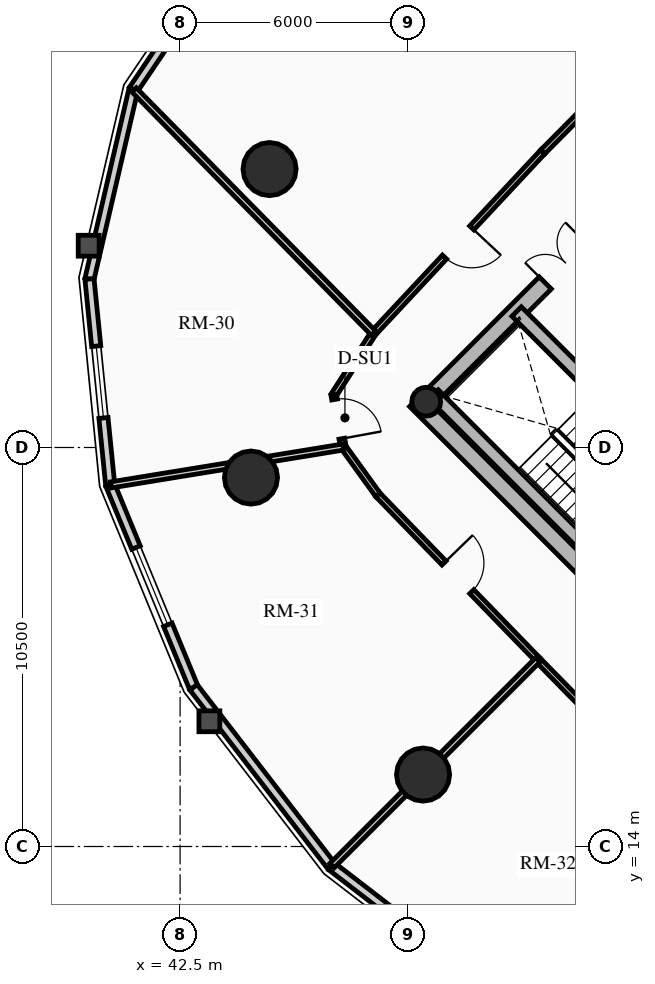
"""IFC4 building model, lengths in metres.
Left out: names, types, materials, properties, quantities, classifications, styles, units other than length and angle.
Written with IfcOpenShell. Run it as: python <this file> out.ifc"""

import sys

from ifc_helpers import new_model, si_unit, direction, frame, frame_2d, origin, origin_2d, place, context, subcontext, project, spatial, rectangle, circle, hollow_circle, extrude, source, transform, mapped, element, fill, save


model = new_model("IFC4")
c1 = context("Model", 3, precision=1e-05, world=origin(), true_north=direction((0.0, 1.0)))
c2 = subcontext(c1, "Body", "Model", "MODEL_VIEW")
j1 = project(units=[si_unit("LENGTHUNIT", "METRE"), si_unit("PLANEANGLEUNIT", "RADIAN")], contexts=[c1])
p1 = place(None, origin())
s1 = spatial("IfcSite", under=j1, at=p1, CompositionType="ELEMENT")
p2 = place(p1, origin())
s2 = spatial("IfcBuilding", under=s1, at=p2, CompositionType="ELEMENT")
p3 = place(p2, frame((0.0, 0.0, 81.79)))
s3 = spatial("IfcBuildingStorey", under=s2, at=p3, CompositionType="ELEMENT", Elevation=81.79)
p4 = place(p3, frame((58.737, 15.697, 0.0), z_axis=(0.0, 0.0, 1.0), x_axis=(-0.707106781187, 0.707106781187, 0.0)))
e1 = element("IfcWall", 1, at=p4, inside=s3, PredefinedType="SHEAR", context=c2, shape_type="SweptSolid", body=[
    extrude(rectangle(XDim=14.2, YDim=0.45, at=frame_2d((7.1, 0.0))), origin(), (0.0, 0.0, 1.0), 2.91),
])
p5 = place(p3, frame((48.856, 25.578, 0.0), z_axis=(0.0, 0.0, 1.0), x_axis=(0.707106781187, 0.707106781187, 0.0)))
e2 = element("IfcWall", 2, at=p5, inside=s3, PredefinedType="SHEAR", context=c2, shape_type="SweptSolid", body=[
    extrude(rectangle(XDim=10.7, YDim=0.45, at=frame_2d((5.35, 0.0))), origin(), (0.0, 0.0, 1.0), 2.91),
])
m1 = source(origin(), c2, "Body", "SweptSolid", [
    extrude(rectangle(XDim=1.5, YDim=2.02, at=frame_2d((0.75, 1.01))), frame((0.0, 0.235, 0.0), z_axis=(0.0, -1.0, 0.0), x_axis=(1.0, 0.0, 0.0)), (0.0, 0.0, 1.0), 0.47),
])
p6 = place(p5, frame((4.6, 0.0, 0.0)))
e3 = element("IfcOpeningElement", 3, at=p6, cuts=e2, PredefinedType="OPENING", context=c2, shape_type="MappedRepresentation", body=[
    mapped(m1, transform((0.0, 0.0, 0.0), x_axis=(1.0, 0.0, 0.0), y_axis=(0.0, 1.0, 0.0), z_axis=(0.0, 0.0, 1.0), scale=1.0)),
])
p7 = place(p3, frame((61.078, 18.355, 0.0), z_axis=(0.0, 0.0, 1.0), x_axis=(-0.707106781187, 0.707106781187, 0.0)))
e4 = element("IfcWall", 4, at=p7, inside=s3, PredefinedType="SHEAR", context=c2, shape_type="SweptSolid", body=[
    extrude(rectangle(XDim=13.75, YDim=0.35, at=frame_2d((6.875, 0.0))), origin(), (0.0, 0.0, 1.0), 2.91),
])
m2 = source(origin(), c2, "Body", "SweptSolid", [
    extrude(rectangle(XDim=1.1, YDim=2.015, at=frame_2d((0.55, 1.007))), frame((0.0, 0.185, 0.0), z_axis=(0.0, -1.0, 0.0), x_axis=(1.0, 0.0, 0.0)), (0.0, 0.0, 1.0), 0.37),
])
p8 = place(p7, frame((4.875, 0.0, 0.0)))
e5 = element("IfcOpeningElement", 5, at=p8, cuts=e4, PredefinedType="OPENING", context=c2, shape_type="MappedRepresentation", body=[
    mapped(m2, transform((0.0, 0.0, 0.0), x_axis=(1.0, 0.0, 0.0), y_axis=(0.0, 1.0, 0.0), z_axis=(0.0, 0.0, 1.0), scale=1.0)),
])
m3 = source(origin(), c2, "Body", "SweptSolid", [
    extrude(rectangle(XDim=1.15, YDim=2.02, at=frame_2d((0.575, 1.01))), frame((0.0, 0.185, 0.0), z_axis=(0.0, -1.0, 0.0), x_axis=(1.0, 0.0, 0.0)), (0.0, 0.0, 1.0), 0.37),
])
p9 = place(p7, frame((7.295, 0.0, 0.0)))
e6 = element("IfcOpeningElement", 6, at=p9, cuts=e4, PredefinedType="OPENING", context=c2, shape_type="MappedRepresentation", body=[
    mapped(m3, transform((0.0, 0.0, 0.0), x_axis=(1.0, 0.0, 0.0), y_axis=(0.0, 1.0, 0.0), z_axis=(0.0, 0.0, 1.0), scale=1.0)),
])
p10 = place(p3, frame((53.922, 21.141, 0.0), z_axis=(0.0, 0.0, 1.0), x_axis=(-0.707088616009, 0.707124945897, 0.0)))
e7 = element("IfcWall", 7, at=p10, inside=s3, PredefinedType="SHEAR", context=c2, shape_type="SweptSolid", body=[
    extrude(rectangle(XDim=6.72, YDim=0.35, at=frame_2d((3.36, 0.0))), origin(), (0.0, 0.0, 1.0), 2.91),
])
p11 = place(p3, frame((48.976, 25.706, 0.0), z_axis=(0.0, 0.0, 1.0), x_axis=(0.707106781187, 0.707106781187, 0.0)))
e8 = element("IfcColumn", 8, at=p11, inside=s3, PredefinedType="COLUMN", context=c2, shape_type="SweptSolid", body=[
    extrude(hollow_circle(Radius=0.38, WallThickness=0.032, at=origin_2d()), origin(), (0.0, 0.0, 1.0), 2.91),
])
for number, where, z_axis, x_axis in (
    (9, (44.854, 31.827, 0.0), (0.0, 0.0, 1.0), (1.0, 0.0, 0.0)),
    (10, (44.365, 23.709, 0.0), (0.0, 0.0, 1.0), (1.0, 0.0, 0.0)),
    (11, (48.893, 15.893, 0.0), (0.0, 0.0, 1.0), (1.0, 0.0, 0.0)),
):
    element("IfcColumn", number, at=place(p3, frame(where, z_axis=z_axis, x_axis=x_axis)), inside=s3, PredefinedType="USERDEFINED", context=c2, shape_type="SweptSolid", body=[
        extrude(circle(Radius=0.7, at=origin_2d()), origin(), (0.0, 0.0, 1.0), 2.91),
    ])
p12 = place(p3, frame((41.271, 33.92, 0.0), z_axis=(0.0, 0.0, 1.0), x_axis=(0.559572880421, 0.828781148131, 0.0)))
e12 = element("IfcWall", 12, at=p12, inside=s3, PredefinedType="SOLIDWALL", context=c2, shape_type="SweptSolid", body=[
    extrude(rectangle(XDim=4.905, YDim=0.24, at=frame_2d((2.452, 0.0))), origin(), (0.0, 0.0, 1.0), 2.179),
])
m4 = source(origin(), c2, "Body", "SweptSolid", [
    extrude(rectangle(XDim=2.2, YDim=1.35, at=frame_2d((1.1, 0.675))), frame((0.0, 0.13, 0.0), z_axis=(0.0, -1.0, 0.0), x_axis=(1.0, 0.0, 0.0)), (0.0, 0.0, 1.0), 0.26),
])
p13 = place(p12, frame((1.352, 0.0, 0.65)))
e13 = element("IfcOpeningElement", 13, at=p13, cuts=e12, PredefinedType="OPENING", context=c2, shape_type="MappedRepresentation", body=[
    mapped(m4, transform((0.0, 0.0, 0.0), x_axis=(1.0, 0.0, 0.0), y_axis=(0.0, 1.0, 0.0), z_axis=(0.0, 0.0, 1.0), scale=1.0)),
])
p14 = place(p3, frame((40.115, 28.933, 0.0), z_axis=(0.0, 0.0, 1.0), x_axis=(0.225834725257, 0.974165631126, 0.0)))
e14 = element("IfcWall", 14, at=p14, inside=s3, PredefinedType="SOLIDWALL", context=c2, shape_type="SweptSolid", body=[
    extrude(rectangle(XDim=5.119, YDim=0.24, at=frame_2d((2.56, 0.0))), origin(), (0.0, 0.0, 1.0), 2.179),
])
p15 = place(p3, frame((40.661, 23.513, 0.0), z_axis=(0.0, 0.0, 1.0), x_axis=(-0.10015591906, 0.994971754311, 0.0)))
e15 = element("IfcWall", 15, at=p15, inside=s3, PredefinedType="SOLIDWALL", context=c2, shape_type="SweptSolid", body=[
    extrude(rectangle(XDim=5.448, YDim=0.24, at=frame_2d((2.724, 0.0))), origin(), (0.0, 0.0, 1.0), 2.179),
])
m5 = source(origin(), c2, "Body", "SweptSolid", [
    extrude(rectangle(XDim=1.9, YDim=1.35, at=frame_2d((0.95, 0.675))), frame((0.0, 0.13, 0.0), z_axis=(0.0, -1.0, 0.0), x_axis=(1.0, 0.0, 0.0)), (0.0, 0.0, 1.0), 0.26),
])
p16 = place(p15, frame((1.774, 0.0, 0.65)))
e16 = element("IfcOpeningElement", 16, at=p16, cuts=e15, PredefinedType="OPENING", context=c2, shape_type="MappedRepresentation", body=[
    mapped(m5, transform((0.0, 0.0, 0.0), x_axis=(1.0, 0.0, 0.0), y_axis=(0.0, 1.0, 0.0), z_axis=(0.0, 0.0, 1.0), scale=1.0)),
])
p17 = place(p3, frame((42.855, 18.189, 0.0), z_axis=(0.0, 0.0, 1.0), x_axis=(-0.381027003055, 0.924563909604, 0.0)))
e17 = element("IfcWall", 17, at=p17, inside=s3, PredefinedType="SOLIDWALL", context=c2, shape_type="SweptSolid", body=[
    extrude(rectangle(XDim=5.758, YDim=0.24, at=frame_2d((2.879, 0.0))), origin(), (0.0, 0.0, 1.0), 2.179),
])
p18 = place(p17, frame((1.779, 0.0, 0.65)))
e18 = element("IfcOpeningElement", 18, at=p18, cuts=e17, PredefinedType="OPENING", context=c2, shape_type="MappedRepresentation", body=[
    mapped(m4, transform((0.0, 0.0, 0.0), x_axis=(1.0, 0.0, 0.0), y_axis=(0.0, 1.0, 0.0), z_axis=(0.0, 0.0, 1.0), scale=1.0)),
])
p19 = place(p3, frame((46.483, 13.483, 0.0), z_axis=(0.0, 0.0, 1.0), x_axis=(-0.61054437102, 0.791982052206, 0.0)))
e19 = element("IfcWall", 19, at=p19, inside=s3, PredefinedType="SOLIDWALL", context=c2, shape_type="SweptSolid", body=[
    extrude(rectangle(XDim=5.942, YDim=0.24, at=frame_2d((2.971, 0.0))), origin(), (0.0, 0.0, 1.0), 2.179),
])
p20 = place(p3, frame((51.189, 9.855, 0.0), z_axis=(0.0, 0.0, 1.0), x_axis=(-0.791982052206, 0.61054437102, 0.0)))
e20 = element("IfcWall", 20, at=p20, inside=s3, PredefinedType="SOLIDWALL", context=c2, shape_type="SweptSolid", body=[
    extrude(rectangle(XDim=5.942, YDim=0.24, at=frame_2d((2.971, 0.0))), origin(), (0.0, 0.0, 1.0), 2.179),
])
p21 = place(p20, frame((2.021, 0.0, 0.65)))
e21 = element("IfcOpeningElement", 21, at=p21, cuts=e20, PredefinedType="OPENING", context=c2, shape_type="MappedRepresentation", body=[
    mapped(m5, transform((0.0, 0.0, 0.0), x_axis=(1.0, 0.0, 0.0), y_axis=(0.0, 1.0, 0.0), z_axis=(0.0, 0.0, 1.0), scale=1.0)),
])
p22 = place(p3, frame((54.427, 34.683, 0.0), z_axis=(0.0, 0.0, 1.0), x_axis=(-0.704178989986, -0.710022499687, 0.0)))
e22 = element("IfcWall", 22, at=p22, inside=s3, PredefinedType="PARTITIONING", context=c2, shape_type="SweptSolid", body=[
    extrude(rectangle(XDim=3.384, YDim=0.15, at=frame_2d((1.692, 0.0))), origin(), (0.0, 0.0, 1.0), 2.225),
])
p23 = place(p3, frame((52.043, 32.28, 0.0), z_axis=(0.0, 0.0, 1.0), x_axis=(-0.682606081633, -0.730786519661, 0.0)))
e23 = element("IfcWall", 23, at=p23, inside=s3, PredefinedType="PARTITIONING", context=c2, shape_type="SweptSolid", body=[
    extrude(rectangle(XDim=6.527, YDim=0.15, at=frame_2d((3.263, 0.0))), origin(), (0.0, 0.0, 1.0), 2.225),
])
m6 = source(origin(), c2, "Body", "SweptSolid", [
    extrude(rectangle(XDim=1.05, YDim=2.015, at=frame_2d((0.525, 1.007))), frame((0.0, 0.085, 0.0), z_axis=(0.0, -1.0, 0.0), x_axis=(1.0, 0.0, 0.0)), (0.0, 0.0, 1.0), 0.17),
])
p24 = place(p23, frame((2.738, 0.0, 0.0)))
e24 = element("IfcOpeningElement", 24, at=p24, cuts=e23, PredefinedType="OPENING", context=c2, shape_type="MappedRepresentation", body=[
    mapped(m6, transform((0.0, 0.0, 0.0), x_axis=(1.0, 0.0, 0.0), y_axis=(0.0, 1.0, 0.0), z_axis=(0.0, 0.0, 1.0), scale=1.0)),
])
p25 = place(p3, frame((47.588, 27.51, 0.0), z_axis=(0.0, 0.0, 1.0), x_axis=(-0.540202619347, -0.841534984449, 0.0)))
e25 = element("IfcWall", 25, at=p25, inside=s3, PredefinedType="PARTITIONING", context=c2, shape_type="SweptSolid", body=[
    extrude(rectangle(XDim=1.935, YDim=0.15, at=frame_2d((0.967, 0.0))), origin(), (0.0, 0.0, 1.0), 2.225),
])
p26 = place(p3, frame((46.543, 25.882, 0.0), z_axis=(0.0, 0.0, 1.0), x_axis=(0.181153502579, -0.983454832976, 0.0)))
e26 = element("IfcWall", 26, at=p26, inside=s3, PredefinedType="PARTITIONING", context=c2, shape_type="SweptSolid", body=[
    extrude(rectangle(XDim=1.392, YDim=0.15, at=frame_2d((0.696, 0.0))), origin(), (0.0, 0.0, 1.0), 2.225),
])
p27 = place(p26, frame((0.12, 0.0, 0.0)))
e27 = element("IfcOpeningElement", 27, at=p27, cuts=e26, PredefinedType="OPENING", context=c2, shape_type="MappedRepresentation", body=[
    mapped(m6, transform((0.0, 0.0, 0.0), x_axis=(1.0, 0.0, 0.0), y_axis=(0.0, 1.0, 0.0), z_axis=(0.0, 0.0, 1.0), scale=1.0)),
])
p28 = place(p3, frame((46.795, 24.513, 0.0), z_axis=(0.0, 0.0, 1.0), x_axis=(0.585628197524, -0.810579801294, 0.0)))
e28 = element("IfcWall", 28, at=p28, inside=s3, PredefinedType="PARTITIONING", context=c2, shape_type="SweptSolid", body=[
    extrude(rectangle(XDim=1.554, YDim=0.15, at=frame_2d((0.777, 0.0))), origin(), (0.0, 0.0, 1.0), 2.225),
])
p29 = place(p3, frame((47.706, 23.253, 0.0), z_axis=(0.0, 0.0, 1.0), x_axis=(0.696179266346, -0.717867974707, 0.0)))
e29 = element("IfcWall", 29, at=p29, inside=s3, PredefinedType="PARTITIONING", context=c2, shape_type="SweptSolid", body=[
    extrude(rectangle(XDim=6.045, YDim=0.15, at=frame_2d((3.022, 0.0))), origin(), (0.0, 0.0, 1.0), 2.655),
])
p30 = place(p29, frame((2.497, 0.0, 0.0)))
e30 = element("IfcOpeningElement", 30, at=p30, cuts=e29, PredefinedType="OPENING", context=c2, shape_type="MappedRepresentation", body=[
    mapped(m6, transform((0.0, 0.0, 0.0), x_axis=(1.0, 0.0, 0.0), y_axis=(0.0, 1.0, 0.0), z_axis=(0.0, 0.0, 1.0), scale=1.0)),
])
p31 = place(p3, frame((51.914, 18.914, 0.0), z_axis=(0.0, 0.0, 1.0), x_axis=(0.699999313799, -0.714143515465, 0.0)))
e31 = element("IfcWall", 31, at=p31, inside=s3, PredefinedType="PARTITIONING", context=c2, shape_type="SweptSolid", body=[
    extrude(rectangle(XDim=6.162, YDim=0.15, at=frame_2d((3.081, 0.0))), origin(), (0.0, 0.0, 1.0), 2.225),
])
p32 = place(p3, frame((54.427, 34.683, 0.0), z_axis=(0.0, 0.0, 1.0), x_axis=(-0.72454072322, 0.689231993161, 0.0)))
e32 = element("IfcWall", 32, at=p32, inside=s3, PredefinedType="PARTITIONING", context=c2, shape_type="SweptSolid", body=[
    extrude(rectangle(XDim=8.747, YDim=0.16, at=frame_2d((4.374, 0.0))), origin(), (0.0, 0.0, 1.0), 2.179),
])
p33 = place(p3, frame((47.588, 27.51, 0.0), z_axis=(0.0, 0.0, 1.0), x_axis=(-0.701457073903, 0.712711704318, 0.0)))
e33 = element("IfcWall", 33, at=p33, inside=s3, PredefinedType="PARTITIONING", context=c2, shape_type="SweptSolid", body=[
    extrude(rectangle(XDim=8.981, YDim=0.16, at=frame_2d((4.49, 0.0))), origin(), (0.0, 0.0, 1.0), 2.179),
])
p34 = place(p3, frame((46.795, 24.513, 0.0), z_axis=(0.0, 0.0, 1.0), x_axis=(-0.986966109862, -0.160928238618, 0.0)))
e34 = element("IfcWall", 34, at=p34, inside=s3, PredefinedType="PARTITIONING", context=c2, shape_type="SweptSolid", body=[
    extrude(rectangle(XDim=6.196, YDim=0.16, at=frame_2d((3.098, 0.0))), origin(), (0.0, 0.0, 1.0), 2.179),
])
p35 = place(p3, frame((51.914, 18.914, 0.0), z_axis=(0.0, 0.0, 1.0), x_axis=(-0.707106781187, -0.707106781187, 0.0)))
e35 = element("IfcWall", 35, at=p35, inside=s3, PredefinedType="PARTITIONING", context=c2, shape_type="SweptSolid", body=[
    extrude(rectangle(XDim=7.661, YDim=0.16, at=frame_2d((3.831, 0.0))), origin(), (0.0, 0.0, 1.0), 2.179),
])
m7 = source(origin(), c2, "Body", "SweptSolid", [
    extrude(rectangle(XDim=1.9, YDim=1.35, at=frame_2d((0.95, 0.675))), frame((0.0, 0.03, 0.0), z_axis=(0.0, -1.0, 0.0), x_axis=(1.0, 0.0, 0.0)), (0.0, 0.0, 1.0), 0.06),
])
p36 = place(p16, origin())
e36 = element("IfcWindow", 36, at=p36, inside=s3, PartitioningType="DOUBLE_PANEL_VERTICAL", PredefinedType="WINDOW", context=c2, shape_type="MappedRepresentation", body=[
    mapped(m7, transform((0.0, 0.0, 0.0), x_axis=(1.0, 0.0, 0.0), y_axis=(0.0, 1.0, 0.0), z_axis=(0.0, 0.0, 1.0), scale=1.0)),
])
fill(e16, e36)
m8 = source(origin(), c2, "Body", "SweptSolid", [
    extrude(rectangle(XDim=2.2, YDim=1.35, at=frame_2d((1.1, 0.675))), frame((0.0, 0.03, 0.0), z_axis=(0.0, -1.0, 0.0), x_axis=(1.0, 0.0, 0.0)), (0.0, 0.0, 1.0), 0.06),
])
p37 = place(p18, origin())
e37 = element("IfcWindow", 37, at=p37, inside=s3, PartitioningType="DOUBLE_PANEL_VERTICAL", PredefinedType="WINDOW", context=c2, shape_type="MappedRepresentation", body=[
    mapped(m8, transform((0.0, 0.0, 0.0), x_axis=(1.0, 0.0, 0.0), y_axis=(0.0, 1.0, 0.0), z_axis=(0.0, 0.0, 1.0), scale=1.0)),
])
fill(e18, e37)
m9 = source(origin(), c2, "Body", "SweptSolid", [
    extrude(rectangle(XDim=1.5, YDim=2.02, at=frame_2d((0.75, 1.01))), frame((0.0, 0.025, 0.0), z_axis=(0.0, -1.0, 0.0), x_axis=(1.0, 0.0, 0.0)), (0.0, 0.0, 1.0), 0.05),
])
p38 = place(p6, origin())
e38 = element("IfcDoor", 38, at=p38, inside=s3, OperationType="DOUBLE_DOOR_SINGLE_SWING", PredefinedType="DOOR", context=c2, shape_type="MappedRepresentation", body=[
    mapped(m9, transform((0.0, 0.0, 0.0), x_axis=(1.0, 0.0, 0.0), y_axis=(0.0, 1.0, 0.0), z_axis=(0.0, 0.0, 1.0), scale=1.0)),
])
fill(e3, e38)
m10 = source(origin(), c2, "Body", "SweptSolid", [
    extrude(rectangle(XDim=1.05, YDim=2.015, at=frame_2d((0.525, 1.007))), frame((0.0, 0.025, 0.0), z_axis=(0.0, -1.0, 0.0), x_axis=(1.0, 0.0, 0.0)), (0.0, 0.0, 1.0), 0.05),
])
p39 = place(p24, origin())
e39 = element("IfcDoor", 39, at=p39, inside=s3, OperationType="SINGLE_SWING_LEFT", PredefinedType="DOOR", context=c2, shape_type="MappedRepresentation", body=[
    mapped(m10, transform((0.0, 0.0, 0.0), x_axis=(1.0, 0.0, 0.0), y_axis=(0.0, 1.0, 0.0), z_axis=(0.0, 0.0, 1.0), scale=1.0)),
])
fill(e24, e39)
p40 = place(p27, origin())
e40 = element("IfcDoor", 40, at=p40, inside=s3, OperationType="SINGLE_SWING_RIGHT", PredefinedType="DOOR", context=c2, shape_type="MappedRepresentation", body=[
    mapped(m10, transform((0.0, 0.0, 0.0), x_axis=(1.0, 0.0, 0.0), y_axis=(0.0, 1.0, 0.0), z_axis=(0.0, 0.0, 1.0), scale=1.0)),
])
fill(e27, e40)
p41 = place(p30, origin())
e41 = element("IfcDoor", 41, at=p41, inside=s3, OperationType="SINGLE_SWING_LEFT", PredefinedType="DOOR", context=c2, shape_type="MappedRepresentation", body=[
    mapped(m10, transform((0.0, 0.0, 0.0), x_axis=(1.0, 0.0, 0.0), y_axis=(0.0, 1.0, 0.0), z_axis=(0.0, 0.0, 1.0), scale=1.0)),
])
fill(e30, e41)
save(model, sys.argv[1])
